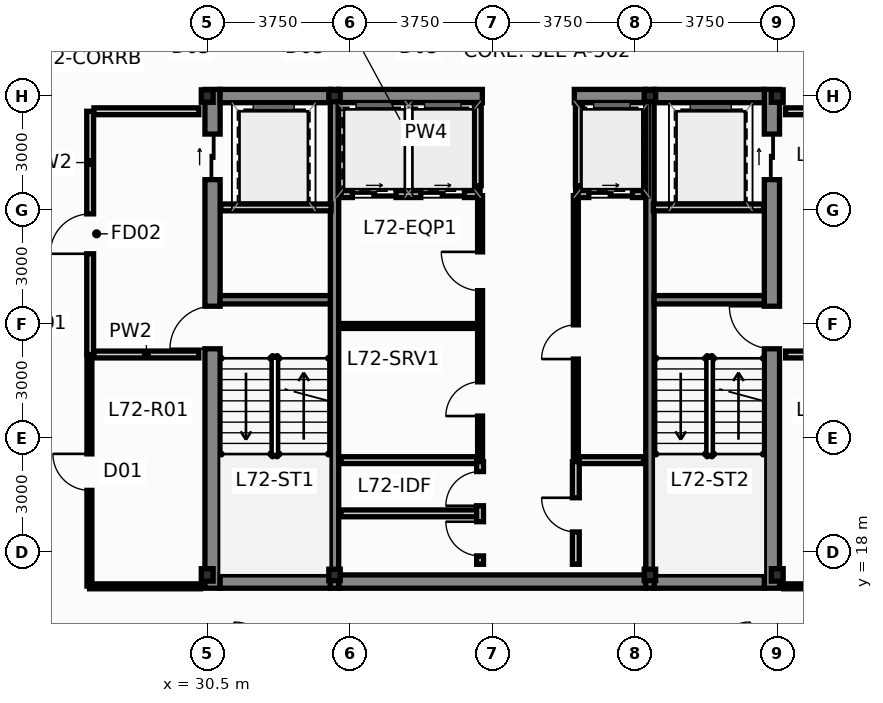
"""IFC4 building model, lengths in metres.
Left out: names, types, materials, properties, quantities, classifications, styles, units other than length and angle.
Written with IfcOpenShell. Run it as: python <this file> out.ifc"""

import sys

from ifc_helpers import new_model, si_unit, direction, frame, frame_2d, origin, origin_2d, place, context, subcontext, project, spatial, rectangle, hollow_rectangle, i_section, extrude, source, transform, mapped, element, fill, save


model = new_model("IFC4")
c1 = context("Model", 3, precision=1e-05, world=origin(), true_north=direction((0.0, 1.0)))
c2 = subcontext(c1, "Body", "Model", "MODEL_VIEW")
j1 = project(units=[si_unit("LENGTHUNIT", "METRE"), si_unit("PLANEANGLEUNIT", "RADIAN")], contexts=[c1])
p1 = place(None, origin())
s1 = spatial("IfcSite", under=j1, at=p1, CompositionType="ELEMENT")
p2 = place(p1, origin())
s2 = spatial("IfcBuilding", under=s1, at=p2, CompositionType="ELEMENT")
p3 = place(p2, frame((0.0, 0.0, 273.65)))
s3 = spatial("IfcBuildingStorey", under=s2, at=p3, CompositionType="ELEMENT", Elevation=273.65)
m1 = source(origin(), c2, "Body", "SweptSolid", [
    extrude(i_section(OverallWidth=0.311, OverallDepth=0.327, WebThickness=0.016, FlangeThickness=0.025, at=origin_2d()), origin(), (0.0, 0.0, 1.0), 3.65),
])
for number, where, z_axis, x_axis in (
    (1, (30.5, 17.4, 0.0), (0.0, 0.0, 1.0), (1.0, 0.0, 0.0)),
    (2, (45.5, 17.4, 0.0), (0.0, 0.0, 1.0), (1.0, 0.0, 0.0)),
    (3, (45.5, 30.0, 0.0), (0.0, 0.0, 1.0), (1.0, 0.0, 0.0)),
    (4, (30.5, 30.0, 0.0), (0.0, 0.0, 1.0), (1.0, 0.0, 0.0)),
):
    element("IfcColumn", number, at=place(p3, frame(where, z_axis=z_axis, x_axis=x_axis)), inside=s3, PredefinedType="COLUMN", context=c2, shape_type="MappedRepresentation", body=[
        mapped(m1, transform((0.0, 0.0, 0.0), scale=1.0)),
    ])
m2 = source(origin(), c2, "Body", "SweptSolid", [
    extrude(hollow_rectangle(XDim=0.3, YDim=0.3, WallThickness=0.012, at=origin_2d()), origin(), (0.0, 0.0, 1.0), 3.65),
])
for number, where, z_axis, x_axis in (
    (5, (33.85, 17.4, 0.0), (0.0, 0.0, 1.0), (1.0, 0.0, 0.0)),
    (6, (42.15, 17.4, 0.0), (0.0, 0.0, 1.0), (1.0, 0.0, 0.0)),
    (7, (33.85, 30.0, 0.0), (0.0, 0.0, 1.0), (1.0, 0.0, 0.0)),
    (8, (42.15, 30.0, 0.0), (0.0, 0.0, 1.0), (1.0, 0.0, 0.0)),
):
    element("IfcColumn", number, at=place(p3, frame(where, z_axis=z_axis, x_axis=x_axis)), inside=s3, PredefinedType="COLUMN", context=c2, shape_type="MappedRepresentation", body=[
        mapped(m2, transform((0.0, 0.0, 0.0), scale=1.0)),
    ])
p4 = place(p3, frame((30.64, 17.05, 0.0), z_axis=(0.0, 0.0, 1.0), x_axis=(0.0, 1.0, 0.0)))
e9 = element("IfcWall", 9, at=p4, inside=s3, PredefinedType="SHEAR", context=c2, shape_type="SweptSolid", body=[
    extrude(rectangle(XDim=13.125, YDim=0.4, at=frame_2d((6.562, 0.0))), origin(), (0.0, 0.0, 1.0), 3.65),
])
p5 = place(p4, frame((6.3, 0.0, 0.0)))
e10 = element("IfcOpeningElement", 10, at=p5, cuts=e9, PredefinedType="OPENING", context=c2, shape_type="SweptSolid", body=[
    extrude(rectangle(XDim=1.12, YDim=2.15, at=frame_2d((0.56, 1.075))), frame((0.0, 0.212, 0.0), z_axis=(0.0, -1.0, 0.0), x_axis=(1.0, 0.0, 0.0)), (0.0, 0.0, 1.0), 0.424),
])
p6 = place(p4, frame((10.75, 0.0, 0.0)))
e11 = element("IfcOpeningElement", 11, at=p6, cuts=e9, PredefinedType="OPENING", context=c2, shape_type="SweptSolid", body=[
    extrude(rectangle(XDim=1.2, YDim=2.2, at=frame_2d((0.6, 1.1))), frame((0.0, 0.212, 0.0), z_axis=(0.0, -1.0, 0.0), x_axis=(1.0, 0.0, 0.0)), (0.0, 0.0, 1.0), 0.424),
])
p7 = place(p3, frame((45.36, 17.05, 0.0), z_axis=(0.0, 0.0, 1.0), x_axis=(0.0, 1.0, 0.0)))
e12 = element("IfcWall", 12, at=p7, inside=s3, PredefinedType="SHEAR", context=c2, shape_type="SweptSolid", body=[
    extrude(rectangle(XDim=13.125, YDim=0.4, at=frame_2d((6.562, 0.0))), origin(), (0.0, 0.0, 1.0), 3.65),
])
p8 = place(p7, frame((6.3, 0.0, 0.0)))
e13 = element("IfcOpeningElement", 13, at=p8, cuts=e12, PredefinedType="OPENING", context=c2, shape_type="SweptSolid", body=[
    extrude(rectangle(XDim=1.12, YDim=2.15, at=frame_2d((0.56, 1.075))), frame((0.0, 0.212, 0.0), z_axis=(0.0, -1.0, 0.0), x_axis=(1.0, 0.0, 0.0)), (0.0, 0.0, 1.0), 0.424),
])
p9 = place(p7, frame((10.75, 0.0, 0.0)))
e14 = element("IfcOpeningElement", 14, at=p9, cuts=e12, PredefinedType="OPENING", context=c2, shape_type="SweptSolid", body=[
    extrude(rectangle(XDim=1.2, YDim=2.2, at=frame_2d((0.6, 1.1))), frame((0.0, 0.212, 0.0), z_axis=(0.0, -1.0, 0.0), x_axis=(1.0, 0.0, 0.0)), (0.0, 0.0, 1.0), 0.424),
])
p10 = place(p3, frame((30.84, 17.225, 0.0), z_axis=(0.0, 0.0, 1.0), x_axis=(1.0, 0.0, 0.0)))
e15 = element("IfcWall", 15, at=p10, inside=s3, PredefinedType="SHEAR", context=c2, shape_type="SweptSolid", body=[
    extrude(rectangle(XDim=2.9, YDim=0.35, at=frame_2d((1.45, 0.0))), origin(), (0.0, 0.0, 1.0), 3.65),
])
p11 = place(p3, frame((33.96, 17.225, 0.0), z_axis=(0.0, 0.0, 1.0), x_axis=(1.0, 0.0, 0.0)))
e16 = element("IfcWall", 16, at=p11, inside=s3, PredefinedType="SHEAR", context=c2, shape_type="SweptSolid", body=[
    extrude(rectangle(XDim=8.08, YDim=0.35, at=frame_2d((4.04, 0.0))), origin(), (0.0, 0.0, 1.0), 3.65),
])
for number, where, z_axis, x_axis in (
    (17, (42.26, 17.225, 0.0), (0.0, 0.0, 1.0), (1.0, 0.0, 0.0)),
    (18, (30.84, 30.0, 0.0), (0.0, 0.0, 1.0), (1.0, 0.0, 0.0)),
):
    element("IfcWall", number, at=place(p3, frame(where, z_axis=z_axis, x_axis=x_axis)), inside=s3, PredefinedType="SHEAR", context=c2, shape_type="SweptSolid", body=[
        extrude(rectangle(XDim=2.9, YDim=0.35, at=frame_2d((1.45, 0.0))), origin(), (0.0, 0.0, 1.0), 3.65),
    ])
p12 = place(p3, frame((33.96, 30.0, 0.0), z_axis=(0.0, 0.0, 1.0), x_axis=(1.0, 0.0, 0.0)))
e19 = element("IfcWall", 19, at=p12, inside=s3, PredefinedType="SHEAR", context=c2, shape_type="SweptSolid", body=[
    extrude(rectangle(XDim=3.78, YDim=0.35, at=frame_2d((1.89, 0.0))), origin(), (0.0, 0.0, 1.0), 3.65),
])
p13 = place(p3, frame((40.16, 30.0, 0.0), z_axis=(0.0, 0.0, 1.0), x_axis=(1.0, 0.0, 0.0)))
e20 = element("IfcWall", 20, at=p13, inside=s3, PredefinedType="SHEAR", context=c2, shape_type="SweptSolid", body=[
    extrude(rectangle(XDim=1.88, YDim=0.35, at=frame_2d((0.94, 0.0))), origin(), (0.0, 0.0, 1.0), 3.65),
])
p14 = place(p3, frame((42.26, 30.0, 0.0), z_axis=(0.0, 0.0, 1.0), x_axis=(1.0, 0.0, 0.0)))
e21 = element("IfcWall", 21, at=p14, inside=s3, PredefinedType="SHEAR", context=c2, shape_type="SweptSolid", body=[
    extrude(rectangle(XDim=2.9, YDim=0.35, at=frame_2d((1.45, 0.0))), origin(), (0.0, 0.0, 1.0), 3.65),
])
for number, where, z_axis, x_axis in (
    (22, (33.85, 17.05, 0.0), (0.0, 0.0, 1.0), (0.0, 1.0, 0.0)),
    (23, (42.15, 17.05, 0.0), (0.0, 0.0, 1.0), (0.0, 1.0, 0.0)),
):
    element("IfcWall", number, at=place(p3, frame(where, z_axis=z_axis, x_axis=x_axis)), inside=s3, PredefinedType="SHEAR", context=c2, shape_type="SweptSolid", body=[
        extrude(rectangle(XDim=13.125, YDim=0.22, at=frame_2d((6.562, 0.0))), origin(), (0.0, 0.0, 1.0), 3.65),
    ])
for number, where, z_axis, x_axis in (
    (24, (30.84, 24.64, 0.0), (0.0, 0.0, 1.0), (1.0, 0.0, 0.0)),
    (25, (42.26, 24.64, 0.0), (0.0, 0.0, 1.0), (1.0, 0.0, 0.0)),
):
    element("IfcWall", number, at=place(p3, frame(where, z_axis=z_axis, x_axis=x_axis)), inside=s3, PredefinedType="SHEAR", context=c2, shape_type="SweptSolid", body=[
        extrude(rectangle(XDim=2.9, YDim=0.22, at=frame_2d((1.45, 0.0))), origin(), (0.0, 0.0, 1.0), 3.65),
    ])
p15 = place(p3, frame((34.02, 27.42, 0.0), z_axis=(0.0, 0.0, 1.0), x_axis=(1.0, 0.0, 0.0)))
e26 = element("IfcWall", 26, at=p15, inside=s3, PredefinedType="PARTITIONING", context=c2, shape_type="SweptSolid", body=[
    extrude(rectangle(XDim=3.66, YDim=0.18, at=frame_2d((1.83, 0.0))), origin(), (0.0, 0.0, 1.0), 3.4),
])
p16 = place(p15, frame((0.3, 0.0, 0.0)))
e27 = element("IfcOpeningElement", 27, at=p16, cuts=e26, PredefinedType="OPENING", context=c2, shape_type="SweptSolid", body=[
    extrude(rectangle(XDim=1.15, YDim=2.2, at=frame_2d((0.575, 1.1))), frame((0.0, 0.102, 0.0), z_axis=(0.0, -1.0, 0.0), x_axis=(1.0, 0.0, 0.0)), (0.0, 0.0, 1.0), 0.204),
])
p17 = place(p15, frame((2.1, 0.0, 0.0)))
e28 = element("IfcOpeningElement", 28, at=p17, cuts=e26, PredefinedType="OPENING", context=c2, shape_type="SweptSolid", body=[
    extrude(rectangle(XDim=1.15, YDim=2.2, at=frame_2d((0.575, 1.1))), frame((0.0, 0.102, 0.0), z_axis=(0.0, -1.0, 0.0), x_axis=(1.0, 0.0, 0.0)), (0.0, 0.0, 1.0), 0.204),
])
p18 = place(p3, frame((40.22, 27.42, 0.0), z_axis=(0.0, 0.0, 1.0), x_axis=(1.0, 0.0, 0.0)))
e29 = element("IfcWall", 29, at=p18, inside=s3, PredefinedType="PARTITIONING", context=c2, shape_type="SweptSolid", body=[
    extrude(rectangle(XDim=1.76, YDim=0.18, at=frame_2d((0.88, 0.0))), origin(), (0.0, 0.0, 1.0), 3.4),
])
p19 = place(p18, frame((0.32, 0.0, 0.0)))
e30 = element("IfcOpeningElement", 30, at=p19, cuts=e29, PredefinedType="OPENING", context=c2, shape_type="SweptSolid", body=[
    extrude(rectangle(XDim=1.15, YDim=2.2, at=frame_2d((0.575, 1.1))), frame((0.0, 0.102, 0.0), z_axis=(0.0, -1.0, 0.0), x_axis=(1.0, 0.0, 0.0)), (0.0, 0.0, 1.0), 0.204),
])
for number, where, z_axis, x_axis in (
    (31, (37.62, 27.64, 0.0), (0.0, 0.0, 1.0), (0.0, 1.0, 0.0)),
    (32, (40.28, 27.64, 0.0), (0.0, 0.0, 1.0), (0.0, 1.0, 0.0)),
):
    element("IfcWall", number, at=place(p3, frame(where, z_axis=z_axis, x_axis=x_axis)), inside=s3, PredefinedType="PARTITIONING", context=c2, shape_type="SweptSolid", body=[
        extrude(rectangle(XDim=2.11, YDim=0.18, at=frame_2d((1.055, 0.0))), origin(), (0.0, 0.0, 1.0), 3.4),
    ])
p20 = place(p3, frame((27.42, 23.2, 0.0), z_axis=(0.0, 0.0, 1.0), x_axis=(0.0, 1.0, 0.0)))
e33 = element("IfcWall", 33, at=p20, inside=s3, PredefinedType="PARTITIONING", context=c2, shape_type="SweptSolid", body=[
    extrude(rectangle(XDim=6.4, YDim=0.18, at=frame_2d((3.2, 0.0))), origin(), (0.0, 0.0, 1.0), 3.129),
])
p21 = place(p20, frame((2.65, 0.0, 0.0)))
e34 = element("IfcOpeningElement", 34, at=p21, cuts=e33, PredefinedType="OPENING", context=c2, shape_type="SweptSolid", body=[
    extrude(rectangle(XDim=1.05, YDim=2.15, at=frame_2d((0.525, 1.075))), frame((0.0, 0.102, 0.0), z_axis=(0.0, -1.0, 0.0), x_axis=(1.0, 0.0, 0.0)), (0.0, 0.0, 1.0), 0.204),
])
for number, where, z_axis, x_axis in (
    (35, (27.52, 23.2, 0.0), (0.0, 0.0, 1.0), (1.0, 0.0, 0.0)),
    (36, (27.52, 29.6, 0.0), (0.0, 0.0, 1.0), (1.0, 0.0, 0.0)),
    (37, (45.72, 23.2, 0.0), (0.0, 0.0, 1.0), (1.0, 0.0, 0.0)),
    (38, (45.72, 29.6, 0.0), (0.0, 0.0, 1.0), (1.0, 0.0, 0.0)),
):
    element("IfcWall", number, at=place(p3, frame(where, z_axis=z_axis, x_axis=x_axis)), inside=s3, PredefinedType="PARTITIONING", context=c2, shape_type="SweptSolid", body=[
        extrude(rectangle(XDim=2.76, YDim=0.18, at=frame_2d((1.38, 0.0))), origin(), (0.0, 0.0, 1.0), 3.4),
    ])
for number, where, z_axis, x_axis in (
    (39, (30.86, 27.07, 0.0), (0.0, 0.0, 1.0), (1.0, 0.0, 0.0)),
    (40, (42.24, 27.07, 0.0), (0.0, 0.0, 1.0), (1.0, 0.0, 0.0)),
):
    element("IfcWall", number, at=place(p3, frame(where, z_axis=z_axis, x_axis=x_axis)), inside=s3, PredefinedType="PARTITIONING", context=c2, shape_type="SweptSolid", body=[
        extrude(rectangle(XDim=2.9, YDim=0.18, at=frame_2d((1.45, 0.0))), origin(), (0.0, 0.0, 1.0), 3.4),
    ])
p22 = place(p3, frame((34.02, 20.42, 0.0), z_axis=(0.0, 0.0, 1.0), x_axis=(1.0, 0.0, 0.0)))
e41 = element("IfcWall", 41, at=p22, inside=s3, PredefinedType="PARTITIONING", context=c2, shape_type="SweptSolid", body=[
    extrude(rectangle(XDim=3.64, YDim=0.18, at=frame_2d((1.82, 0.0))), origin(), (0.0, 0.0, 1.0), 3.4),
])
p23 = place(p3, frame((40.22, 20.42, 0.0), z_axis=(0.0, 0.0, 1.0), x_axis=(1.0, 0.0, 0.0)))
e42 = element("IfcWall", 42, at=p23, inside=s3, PredefinedType="PARTITIONING", context=c2, shape_type="SweptSolid", body=[
    extrude(rectangle(XDim=1.76, YDim=0.18, at=frame_2d((0.88, 0.0))), origin(), (0.0, 0.0, 1.0), 3.4),
])
p24 = place(p3, frame((34.02, 23.95, 0.0), z_axis=(0.0, 0.0, 1.0), x_axis=(1.0, 0.0, 0.0)))
e43 = element("IfcWall", 43, at=p24, inside=s3, PredefinedType="PARTITIONING", context=c2, shape_type="SweptSolid", body=[
    extrude(rectangle(XDim=3.58, YDim=0.13, at=frame_2d((1.79, 0.0))), origin(), (0.0, 0.0, 1.0), 3.4),
])
p25 = place(p3, frame((37.68, 20.48, 0.0), z_axis=(0.0, 0.0, 1.0), x_axis=(0.0, 1.0, 0.0)))
e44 = element("IfcWall", 44, at=p25, inside=s3, PredefinedType="PARTITIONING", context=c2, shape_type="SweptSolid", body=[
    extrude(rectangle(XDim=6.9, YDim=0.13, at=frame_2d((3.45, 0.0))), origin(), (0.0, 0.0, 1.0), 3.4),
])
p26 = place(p25, frame((1.1, 0.0, 0.0)))
e45 = element("IfcOpeningElement", 45, at=p26, cuts=e44, PredefinedType="OPENING", context=c2, shape_type="SweptSolid", body=[
    extrude(rectangle(XDim=0.9, YDim=2.1, at=frame_2d((0.45, 1.05))), frame((0.0, 0.077, 0.0), z_axis=(0.0, -1.0, 0.0), x_axis=(1.0, 0.0, 0.0)), (0.0, 0.0, 1.0), 0.154),
])
p27 = place(p25, frame((4.4, 0.0, 0.0)))
e46 = element("IfcOpeningElement", 46, at=p27, cuts=e44, PredefinedType="OPENING", context=c2, shape_type="SweptSolid", body=[
    extrude(rectangle(XDim=1.02, YDim=2.15, at=frame_2d((0.51, 1.075))), frame((0.0, 0.077, 0.0), z_axis=(0.0, -1.0, 0.0), x_axis=(1.0, 0.0, 0.0)), (0.0, 0.0, 1.0), 0.154),
])
p28 = place(p3, frame((40.2, 20.48, 0.0), z_axis=(0.0, 0.0, 1.0), x_axis=(0.0, 1.0, 0.0)))
e47 = element("IfcWall", 47, at=p28, inside=s3, PredefinedType="PARTITIONING", context=c2, shape_type="SweptSolid", body=[
    extrude(rectangle(XDim=6.9, YDim=0.13, at=frame_2d((3.45, 0.0))), origin(), (0.0, 0.0, 1.0), 3.4),
])
p29 = place(p28, frame((2.6, 0.0, 0.0)))
e48 = element("IfcOpeningElement", 48, at=p29, cuts=e47, PredefinedType="OPENING", context=c2, shape_type="SweptSolid", body=[
    extrude(rectangle(XDim=0.9, YDim=2.1, at=frame_2d((0.45, 1.05))), frame((0.0, 0.077, 0.0), z_axis=(0.0, -1.0, 0.0), x_axis=(1.0, 0.0, 0.0)), (0.0, 0.0, 1.0), 0.154),
])
p30 = place(p3, frame((34.02, 19.02, 0.0), z_axis=(0.0, 0.0, 1.0), x_axis=(1.0, 0.0, 0.0)))
e49 = element("IfcWall", 49, at=p30, inside=s3, PredefinedType="PARTITIONING", context=c2, shape_type="SweptSolid", body=[
    extrude(rectangle(XDim=3.58, YDim=0.18, at=frame_2d((1.79, 0.0))), origin(), (0.0, 0.0, 1.0), 3.4),
])
p31 = place(p3, frame((37.68, 17.68, 0.0), z_axis=(0.0, 0.0, 1.0), x_axis=(0.0, 1.0, 0.0)))
e50 = element("IfcWall", 50, at=p31, inside=s3, PredefinedType="PARTITIONING", context=c2, shape_type="SweptSolid", body=[
    extrude(rectangle(XDim=2.7, YDim=0.18, at=frame_2d((1.35, 0.0))), origin(), (0.0, 0.0, 1.0), 3.4),
])
p32 = place(p31, frame((0.22, 0.0, 0.0)))
e51 = element("IfcOpeningElement", 51, at=p32, cuts=e50, PredefinedType="OPENING", context=c2, shape_type="SweptSolid", body=[
    extrude(rectangle(XDim=0.9, YDim=2.1, at=frame_2d((0.45, 1.05))), frame((0.0, 0.102, 0.0), z_axis=(0.0, -1.0, 0.0), x_axis=(1.0, 0.0, 0.0)), (0.0, 0.0, 1.0), 0.204),
])
p33 = place(p31, frame((1.54, 0.0, 0.0)))
e52 = element("IfcOpeningElement", 52, at=p33, cuts=e50, PredefinedType="OPENING", context=c2, shape_type="SweptSolid", body=[
    extrude(rectangle(XDim=0.9, YDim=2.1, at=frame_2d((0.45, 1.05))), frame((0.0, 0.102, 0.0), z_axis=(0.0, -1.0, 0.0), x_axis=(1.0, 0.0, 0.0)), (0.0, 0.0, 1.0), 0.204),
])
p34 = place(p3, frame((40.2, 17.68, 0.0), z_axis=(0.0, 0.0, 1.0), x_axis=(0.0, 1.0, 0.0)))
e53 = element("IfcWall", 53, at=p34, inside=s3, PredefinedType="PARTITIONING", context=c2, shape_type="SweptSolid", body=[
    extrude(rectangle(XDim=2.7, YDim=0.18, at=frame_2d((1.35, 0.0))), origin(), (0.0, 0.0, 1.0), 3.4),
])
p35 = place(p34, frame((0.85, 0.0, 0.0)))
e54 = element("IfcOpeningElement", 54, at=p35, cuts=e53, PredefinedType="OPENING", context=c2, shape_type="SweptSolid", body=[
    extrude(rectangle(XDim=0.9, YDim=2.1, at=frame_2d((0.45, 1.05))), frame((0.0, 0.102, 0.0), z_axis=(0.0, -1.0, 0.0), x_axis=(1.0, 0.0, 0.0)), (0.0, 0.0, 1.0), 0.204),
])
p36 = place(p3, frame((27.4, 17.105, 0.0), z_axis=(0.0, 0.0, 1.0), x_axis=(0.0, 1.0, 0.0)))
e55 = element("IfcWall", 55, at=p36, inside=s3, PredefinedType="PARTITIONING", context=c2, shape_type="SweptSolid", body=[
    extrude(rectangle(XDim=6.0, YDim=0.13, at=frame_2d((3.0, 0.0))), origin(), (0.0, 0.0, 1.0), 3.129),
])
p37 = place(p36, frame((2.52, 0.0, 0.0)))
e56 = element("IfcOpeningElement", 56, at=p37, cuts=e55, PredefinedType="OPENING", context=c2, shape_type="SweptSolid", body=[
    extrude(rectangle(XDim=0.96, YDim=2.15, at=frame_2d((0.48, 1.075))), frame((0.0, 0.077, 0.0), z_axis=(0.0, -1.0, 0.0), x_axis=(1.0, 0.0, 0.0)), (0.0, 0.0, 1.0), 0.154),
])
for number, where, z_axis, x_axis in (
    (57, (30.325, 17.1, 0.0), (0.0, 0.0, 1.0), (-1.0, 0.0, 0.0)),
    (58, (45.675, 17.1, 0.0), (0.0, 0.0, 1.0), (1.0, 0.0, 0.0)),
):
    element("IfcWall", number, at=place(p3, frame(where, z_axis=z_axis, x_axis=x_axis)), inside=s3, PredefinedType="PARTITIONING", context=c2, shape_type="SweptSolid", body=[
        extrude(rectangle(XDim=2.92, YDim=0.13, at=frame_2d((1.46, 0.0))), origin(), (0.0, 0.0, 1.0), 2.985),
    ])
p38 = place(p5, origin())
e59 = element("IfcDoor", 59, at=p38, inside=s3, OperationType="SINGLE_SWING_LEFT", PredefinedType="DOOR", context=c2, shape_type="SweptSolid", body=[
    extrude(rectangle(XDim=1.12, YDim=2.15, at=frame_2d((0.56, 1.075))), frame((0.0, 0.025, 0.0), z_axis=(0.0, -1.0, 0.0), x_axis=(1.0, 0.0, 0.0)), (0.0, 0.0, 1.0), 0.05),
])
fill(e10, e59)
p39 = place(p6, origin())
e60 = element("IfcDoor", 60, at=p39, inside=s3, OperationType="SLIDING_TO_LEFT", PredefinedType="DOOR", context=c2, shape_type="SweptSolid", body=[
    extrude(rectangle(XDim=1.2, YDim=2.2, at=frame_2d((0.6, 1.1))), frame((0.0, 0.025, 0.0), z_axis=(0.0, -1.0, 0.0), x_axis=(1.0, 0.0, 0.0)), (0.0, 0.0, 1.0), 0.05),
])
fill(e11, e60)
p40 = place(p8, origin())
e61 = element("IfcDoor", 61, at=p40, inside=s3, OperationType="SINGLE_SWING_RIGHT", PredefinedType="DOOR", context=c2, shape_type="SweptSolid", body=[
    extrude(rectangle(XDim=1.12, YDim=2.15, at=frame_2d((0.56, 1.075))), frame((0.0, 0.025, 0.0), z_axis=(0.0, -1.0, 0.0), x_axis=(1.0, 0.0, 0.0)), (0.0, 0.0, 1.0), 0.05),
])
fill(e13, e61)
p41 = place(p9, origin())
e62 = element("IfcDoor", 62, at=p41, inside=s3, OperationType="SLIDING_TO_RIGHT", PredefinedType="DOOR", context=c2, shape_type="SweptSolid", body=[
    extrude(rectangle(XDim=1.2, YDim=2.2, at=frame_2d((0.6, 1.1))), frame((0.0, 0.025, 0.0), z_axis=(0.0, -1.0, 0.0), x_axis=(1.0, 0.0, 0.0)), (0.0, 0.0, 1.0), 0.05),
])
fill(e14, e62)
p42 = place(p16, origin())
e63 = element("IfcDoor", 63, at=p42, inside=s3, OperationType="SLIDING_TO_RIGHT", PredefinedType="DOOR", context=c2, shape_type="SweptSolid", body=[
    extrude(rectangle(XDim=1.15, YDim=2.2, at=frame_2d((0.575, 1.1))), frame((0.0, 0.025, 0.0), z_axis=(0.0, -1.0, 0.0), x_axis=(1.0, 0.0, 0.0)), (0.0, 0.0, 1.0), 0.05),
])
fill(e27, e63)
p43 = place(p17, origin())
e64 = element("IfcDoor", 64, at=p43, inside=s3, OperationType="SLIDING_TO_LEFT", PredefinedType="DOOR", context=c2, shape_type="SweptSolid", body=[
    extrude(rectangle(XDim=1.15, YDim=2.2, at=frame_2d((0.575, 1.1))), frame((0.0, 0.025, 0.0), z_axis=(0.0, -1.0, 0.0), x_axis=(1.0, 0.0, 0.0)), (0.0, 0.0, 1.0), 0.05),
])
fill(e28, e64)
p44 = place(p19, origin())
e65 = element("IfcDoor", 65, at=p44, inside=s3, OperationType="SLIDING_TO_RIGHT", PredefinedType="DOOR", context=c2, shape_type="SweptSolid", body=[
    extrude(rectangle(XDim=1.15, YDim=2.2, at=frame_2d((0.575, 1.1))), frame((0.0, 0.025, 0.0), z_axis=(0.0, -1.0, 0.0), x_axis=(1.0, 0.0, 0.0)), (0.0, 0.0, 1.0), 0.05),
])
fill(e30, e65)
p45 = place(p21, origin())
e66 = element("IfcDoor", 66, at=p45, inside=s3, OperationType="SINGLE_SWING_LEFT", PredefinedType="DOOR", context=c2, shape_type="SweptSolid", body=[
    extrude(rectangle(XDim=1.05, YDim=2.15, at=frame_2d((0.525, 1.075))), frame((0.0, 0.025, 0.0), z_axis=(0.0, -1.0, 0.0), x_axis=(1.0, 0.0, 0.0)), (0.0, 0.0, 1.0), 0.05),
])
fill(e34, e66)
p46 = place(p26, origin())
e67 = element("IfcDoor", 67, at=p46, inside=s3, OperationType="SINGLE_SWING_LEFT", PredefinedType="DOOR", context=c2, shape_type="SweptSolid", body=[
    extrude(rectangle(XDim=0.9, YDim=2.1, at=frame_2d((0.45, 1.05))), frame((0.0, 0.025, 0.0), z_axis=(0.0, -1.0, 0.0), x_axis=(1.0, 0.0, 0.0)), (0.0, 0.0, 1.0), 0.05),
])
fill(e45, e67)
p47 = place(p27, origin())
e68 = element("IfcDoor", 68, at=p47, inside=s3, OperationType="SINGLE_SWING_RIGHT", PredefinedType="DOOR", context=c2, shape_type="SweptSolid", body=[
    extrude(rectangle(XDim=1.02, YDim=2.15, at=frame_2d((0.51, 1.075))), frame((0.0, 0.025, 0.0), z_axis=(0.0, -1.0, 0.0), x_axis=(1.0, 0.0, 0.0)), (0.0, 0.0, 1.0), 0.05),
])
fill(e46, e68)
p48 = place(p29, origin())
e69 = element("IfcDoor", 69, at=p48, inside=s3, OperationType="SINGLE_SWING_LEFT", PredefinedType="DOOR", context=c2, shape_type="SweptSolid", body=[
    extrude(rectangle(XDim=0.9, YDim=2.1, at=frame_2d((0.45, 1.05))), frame((0.0, 0.025, 0.0), z_axis=(0.0, -1.0, 0.0), x_axis=(1.0, 0.0, 0.0)), (0.0, 0.0, 1.0), 0.05),
])
fill(e48, e69)
p49 = place(p32, origin())
e70 = element("IfcDoor", 70, at=p49, inside=s3, OperationType="SINGLE_SWING_RIGHT", PredefinedType="DOOR", context=c2, shape_type="SweptSolid", body=[
    extrude(rectangle(XDim=0.9, YDim=2.1, at=frame_2d((0.45, 1.05))), frame((0.0, 0.025, 0.0), z_axis=(0.0, -1.0, 0.0), x_axis=(1.0, 0.0, 0.0)), (0.0, 0.0, 1.0), 0.05),
])
fill(e51, e70)
p50 = place(p33, origin())
e71 = element("IfcDoor", 71, at=p50, inside=s3, OperationType="SINGLE_SWING_LEFT", PredefinedType="DOOR", context=c2, shape_type="SweptSolid", body=[
    extrude(rectangle(XDim=0.9, YDim=2.1, at=frame_2d((0.45, 1.05))), frame((0.0, 0.025, 0.0), z_axis=(0.0, -1.0, 0.0), x_axis=(1.0, 0.0, 0.0)), (0.0, 0.0, 1.0), 0.05),
])
fill(e52, e71)
p51 = place(p35, origin())
e72 = element("IfcDoor", 72, at=p51, inside=s3, OperationType="SINGLE_SWING_RIGHT", PredefinedType="DOOR", context=c2, shape_type="SweptSolid", body=[
    extrude(rectangle(XDim=0.9, YDim=2.1, at=frame_2d((0.45, 1.05))), frame((0.0, 0.025, 0.0), z_axis=(0.0, -1.0, 0.0), x_axis=(1.0, 0.0, 0.0)), (0.0, 0.0, 1.0), 0.05),
])
fill(e54, e72)
p52 = place(p37, origin())
e73 = element("IfcDoor", 73, at=p52, inside=s3, OperationType="SINGLE_SWING_RIGHT", PredefinedType="DOOR", context=c2, shape_type="SweptSolid", body=[
    extrude(rectangle(XDim=0.96, YDim=2.15, at=frame_2d((0.48, 1.075))), frame((0.0, 0.025, 0.0), z_axis=(0.0, -1.0, 0.0), x_axis=(1.0, 0.0, 0.0)), (0.0, 0.0, 1.0), 0.05),
])
fill(e56, e73)
save(model, sys.argv[1])
